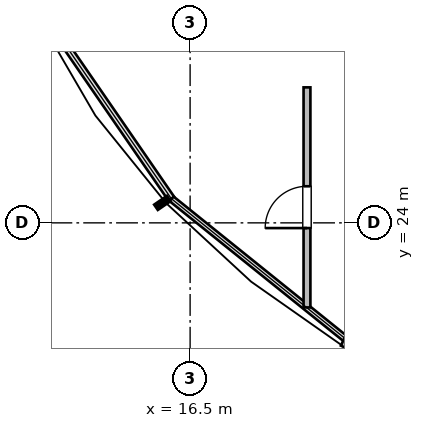
"""IFC4 building model, lengths in metres.
Left out: names, types, materials, properties, quantities, classifications, styles, units other than length and angle.
Written with IfcOpenShell. Run it as: python <this file> out.ifc"""

import sys

from ifc_helpers import new_model, si_unit, direction, frame, frame_2d, origin, place, context, subcontext, project, spatial, rectangle, extrude, element, fill, save


model = new_model("IFC4")
c1 = context("Model", 3, precision=1e-05, world=origin(), true_north=direction((0.0, 1.0)))
c2 = subcontext(c1, "Body", "Model", "MODEL_VIEW")
j1 = project(units=[si_unit("LENGTHUNIT", "METRE"), si_unit("PLANEANGLEUNIT", "RADIAN")], contexts=[c1])
p1 = place(None, origin())
s1 = spatial("IfcSite", under=j1, at=p1, CompositionType="ELEMENT")
p2 = place(p1, origin())
s2 = spatial("IfcBuilding", under=s1, at=p2, CompositionType="ELEMENT")
p3 = place(p2, frame((0.0, 0.0, 163.8)))
s3 = spatial("IfcBuildingStorey", under=s2, at=p3, CompositionType="ELEMENT", Elevation=163.8)
p4 = place(p3, frame((26.994, 17.88, 0.0), z_axis=(0.0, 0.0, 1.0), x_axis=(-0.905106920297, 0.425184034073, 0.0)))
e1 = element("IfcWall", 1, at=p4, inside=s3, PredefinedType="STANDARD", context=c2, shape_type="SweptSolid", body=[
    extrude(rectangle(XDim=7.136, YDim=0.32, at=frame_2d((3.568, 0.0))), origin(), (0.0, 0.0, 1.0), 2.657),
])
p5 = place(p3, frame((19.575, 21.775, 0.0), z_axis=(0.0, 0.0, 1.0), x_axis=(0.0, 1.0, 0.0)))
e2 = element("IfcWall", 2, at=p5, inside=s3, PredefinedType="PARTITIONING", context=c2, shape_type="SweptSolid", body=[
    extrude(rectangle(XDim=5.79, YDim=0.18, at=frame_2d((2.895, 0.0))), origin(), (0.0, 0.0, 1.0), 3.36),
])
p6 = place(p5, frame((2.088, 0.0, 0.0)))
e3 = element("IfcOpeningElement", 3, at=p6, cuts=e2, PredefinedType="OPENING", context=c2, shape_type="SweptSolid", body=[
    extrude(rectangle(XDim=1.1, YDim=2.1, at=frame_2d((0.55, 1.05))), frame((0.0, 0.1, 0.0), z_axis=(0.0, -1.0, 0.0), x_axis=(1.0, 0.0, 0.0)), (0.0, 0.0, 1.0), 0.2),
])
p7 = place(p6, origin())
e4 = element("IfcDoor", 4, at=p7, inside=s3, OperationType="SINGLE_SWING_LEFT", PredefinedType="DOOR", context=c2, shape_type="SweptSolid", body=[
    extrude(rectangle(XDim=1.1, YDim=2.1, at=frame_2d((0.55, 1.05))), frame((0.0, 0.025, 0.0), z_axis=(0.0, -1.0, 0.0), x_axis=(1.0, 0.0, 0.0)), (0.0, 0.0, 1.0), 0.05),
])
fill(e3, e4)
save(model, sys.argv[1])
